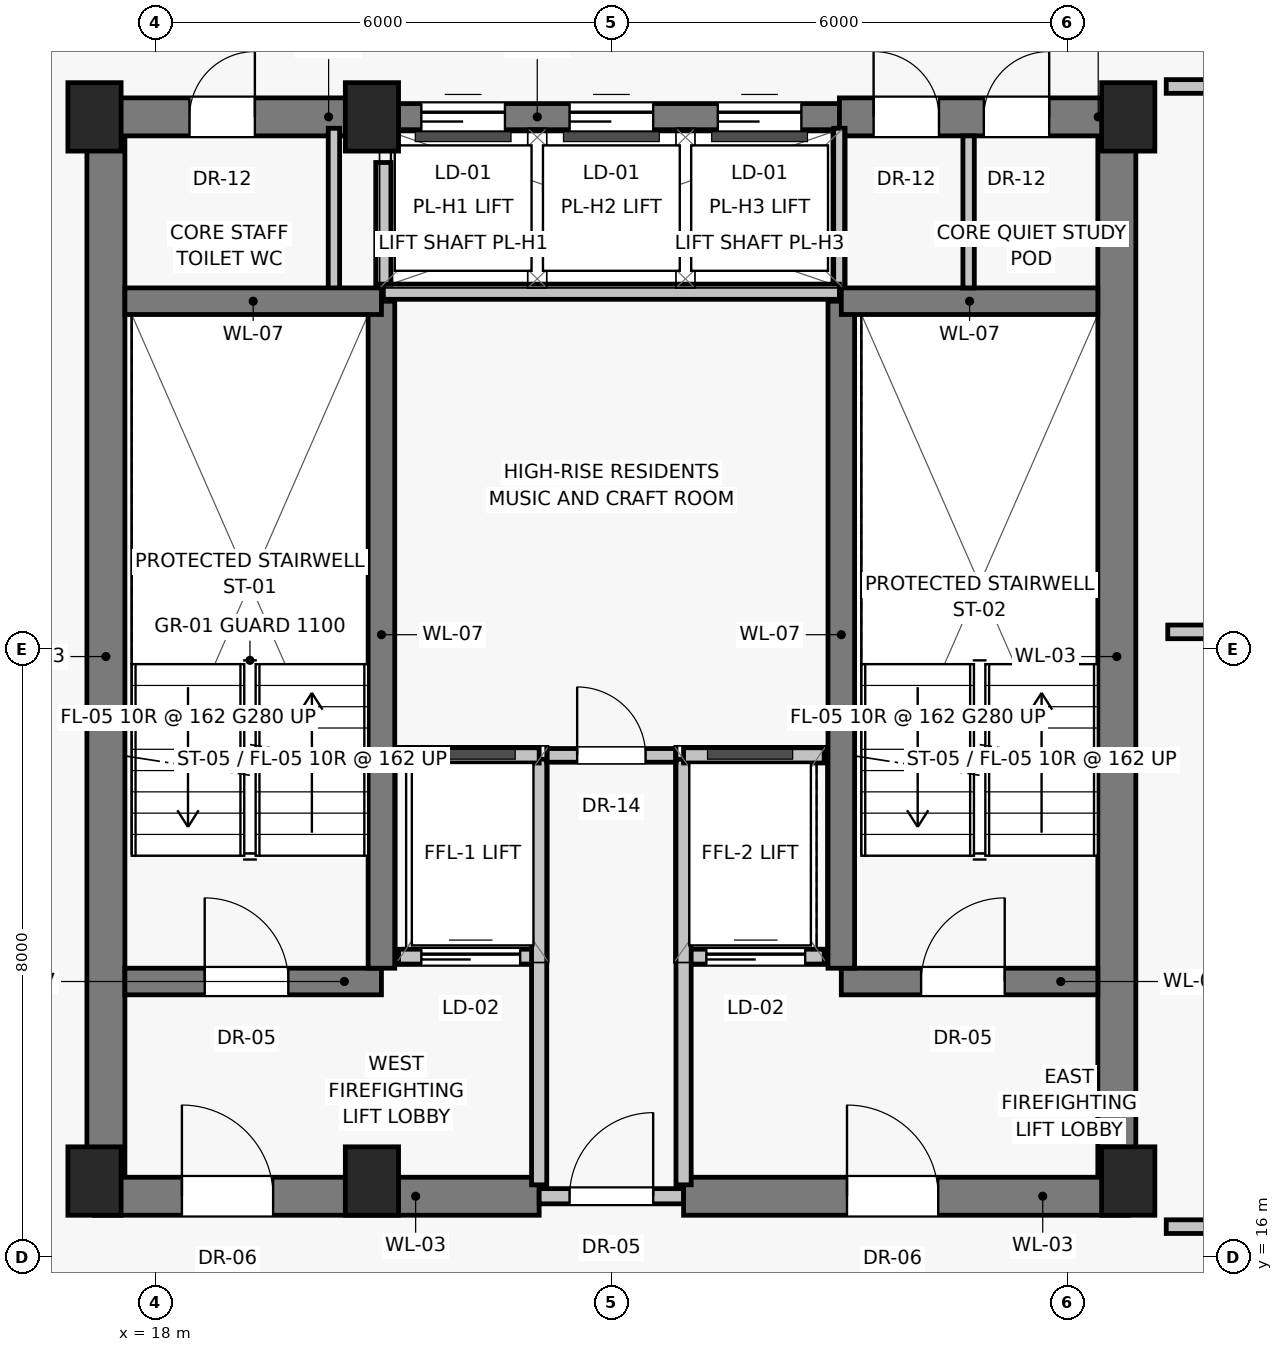
"""IFC4 building model, lengths in metres.
Left out: names, types, materials, properties, quantities, classifications, styles, units other than length and angle.
Written with IfcOpenShell. Run it as: python <this file> out.ifc"""

import sys

from ifc_helpers import new_model, si_unit, direction, frame, frame_2d, origin, origin_2d, place, context, subcontext, project, spatial, rectangle, extrude, source, transform, mapped, element, fill, save


model = new_model("IFC4")
c1 = context("Model", 3, precision=1e-05, world=origin(), true_north=direction((0.0, 1.0)))
c2 = subcontext(c1, "Body", "Model", "MODEL_VIEW")
j1 = project(units=[si_unit("LENGTHUNIT", "METRE"), si_unit("PLANEANGLEUNIT", "RADIAN")], contexts=[c1])
p1 = place(None, origin())
s1 = spatial("IfcSite", under=j1, at=p1, CompositionType="ELEMENT")
p2 = place(p1, origin())
s2 = spatial("IfcBuilding", under=s1, at=p2, CompositionType="ELEMENT")
p3 = place(p2, frame((0.0, 0.0, 208.1)))
s3 = spatial("IfcBuildingStorey", under=s2, at=p3, CompositionType="ELEMENT", Elevation=208.1)
for number, where, z_axis, x_axis in (
    (1, (17.2, 17.0, 0.0), (0.0, 0.0, 1.0), (1.0, 0.0, 0.0)),
    (2, (20.85, 17.0, 0.0), (0.0, 0.0, 1.0), (1.0, 0.0, 0.0)),
    (3, (30.8, 17.0, 0.0), (0.0, 0.0, 1.0), (1.0, 0.0, 0.0)),
    (4, (17.2, 31.0, 0.0), (0.0, 0.0, 1.0), (1.0, 0.0, 0.0)),
    (5, (20.85, 31.0, 0.0), (0.0, 0.0, 1.0), (1.0, 0.0, 0.0)),
    (6, (30.8, 31.0, 0.0), (0.0, 0.0, 1.0), (1.0, 0.0, 0.0)),
):
    element("IfcColumn", number, at=place(p3, frame(where, z_axis=z_axis, x_axis=x_axis)), inside=s3, PredefinedType="PILASTER", context=c2, shape_type="SweptSolid", body=[
        extrude(rectangle(XDim=0.7, YDim=0.9, at=origin_2d()), origin(), (0.0, 0.0, 1.0), 3.25),
    ])
for number, where, z_axis, x_axis in (
    (7, (17.35, 16.8, 0.0), (0.0, 0.0, 1.0), (0.0, 1.0, 0.0)),
    (8, (30.65, 16.8, 0.0), (0.0, 0.0, 1.0), (0.0, 1.0, 0.0)),
):
    element("IfcWall", number, at=place(p3, frame(where, z_axis=z_axis, x_axis=x_axis)), inside=s3, PredefinedType="SHEAR", context=c2, shape_type="SweptSolid", body=[
        extrude(rectangle(XDim=14.2, YDim=0.5, at=frame_2d((7.1, 0.0))), origin(), (0.0, 0.0, 1.0), 2.97),
    ])
p4 = place(p3, frame((17.2, 16.8, 0.0), z_axis=(0.0, 0.0, 1.0), x_axis=(1.0, 0.0, 0.0)))
e9 = element("IfcWall", 9, at=p4, inside=s3, PredefinedType="SHEAR", context=c2, shape_type="SweptSolid", body=[
    extrude(rectangle(XDim=5.85, YDim=0.5, at=frame_2d((2.925, 0.0))), origin(), (0.0, 0.0, 1.0), 2.97),
])
p5 = place(p4, frame((1.15, 0.0, 0.0)))
e10 = element("IfcOpeningElement", 10, at=p5, cuts=e9, PredefinedType="OPENING", context=c2, shape_type="SweptSolid", body=[
    extrude(rectangle(XDim=1.2, YDim=2.03, at=frame_2d((0.6, 1.015))), frame((0.0, 0.26, 0.0), z_axis=(0.0, -1.0, 0.0), x_axis=(1.0, 0.0, 0.0)), (0.0, 0.0, 1.0), 0.52),
])
p6 = place(p3, frame((23.05, 16.8, 0.0), z_axis=(0.0, 0.0, 1.0), x_axis=(1.0, 0.0, 0.0)))
e11 = element("IfcWall", 11, at=p6, inside=s3, PredefinedType="SOLIDWALL", context=c2, shape_type="SweptSolid", body=[
    extrude(rectangle(XDim=1.9, YDim=0.2, at=frame_2d((0.95, 0.0))), origin(), (0.0, 0.0, 1.0), 2.12),
])
p7 = place(p6, frame((0.4, 0.0, 0.0)))
e12 = element("IfcOpeningElement", 12, at=p7, cuts=e11, PredefinedType="OPENING", context=c2, shape_type="SweptSolid", body=[
    extrude(rectangle(XDim=1.1, YDim=2.03, at=frame_2d((0.55, 1.015))), frame((0.0, 0.11, 0.0), z_axis=(0.0, -1.0, 0.0), x_axis=(1.0, 0.0, 0.0)), (0.0, 0.0, 1.0), 0.22),
])
p8 = place(p3, frame((24.95, 16.8, 0.0), z_axis=(0.0, 0.0, 1.0), x_axis=(1.0, 0.0, 0.0)))
e13 = element("IfcWall", 13, at=p8, inside=s3, PredefinedType="SHEAR", context=c2, shape_type="SweptSolid", body=[
    extrude(rectangle(XDim=5.85, YDim=0.5, at=frame_2d((2.925, 0.0))), origin(), (0.0, 0.0, 1.0), 2.97),
])
p9 = place(p8, frame((2.15, 0.0, 0.0)))
e14 = element("IfcOpeningElement", 14, at=p9, cuts=e13, PredefinedType="OPENING", context=c2, shape_type="SweptSolid", body=[
    extrude(rectangle(XDim=1.2, YDim=2.03, at=frame_2d((0.6, 1.015))), frame((0.0, 0.26, 0.0), z_axis=(0.0, -1.0, 0.0), x_axis=(1.0, 0.0, 0.0)), (0.0, 0.0, 1.0), 0.52),
])
p10 = place(p3, frame((17.2, 31.0, 0.0), z_axis=(0.0, 0.0, 1.0), x_axis=(1.0, 0.0, 0.0)))
e15 = element("IfcWall", 15, at=p10, inside=s3, PredefinedType="SHEAR", context=c2, shape_type="SweptSolid", body=[
    extrude(rectangle(XDim=3.8, YDim=0.5, at=frame_2d((1.9, 0.0))), origin(), (0.0, 0.0, 1.0), 2.97),
])
p11 = place(p10, frame((1.25, 0.0, 0.0)))
e16 = element("IfcOpeningElement", 16, at=p11, cuts=e15, PredefinedType="OPENING", context=c2, shape_type="SweptSolid", body=[
    extrude(rectangle(XDim=0.86, YDim=2.01, at=frame_2d((0.43, 1.005))), frame((0.0, 0.26, 0.0), z_axis=(0.0, -1.0, 0.0), x_axis=(1.0, 0.0, 0.0)), (0.0, 0.0, 1.0), 0.52),
])
p12 = place(p3, frame((21.0, 31.0, 0.0), z_axis=(0.0, 0.0, 1.0), x_axis=(1.0, 0.0, 0.0)))
e17 = element("IfcWall", 17, at=p12, inside=s3, PredefinedType="SHEAR", context=c2, shape_type="SweptSolid", body=[
    extrude(rectangle(XDim=6.0, YDim=0.35, at=frame_2d((3.0, 0.0))), origin(), (0.0, 0.0, 1.0), 2.97),
])
p13 = place(p12, frame((0.5, 0.0, 0.0)))
e18 = element("IfcOpeningElement", 18, at=p13, cuts=e17, PredefinedType="OPENING", context=c2, shape_type="SweptSolid", body=[
    extrude(rectangle(XDim=1.1, YDim=2.08, at=frame_2d((0.55, 1.04))), frame((0.0, 0.185, 0.0), z_axis=(0.0, -1.0, 0.0), x_axis=(1.0, 0.0, 0.0)), (0.0, 0.0, 1.0), 0.37),
])
p14 = place(p12, frame((2.45, 0.0, 0.0)))
e19 = element("IfcOpeningElement", 19, at=p14, cuts=e17, PredefinedType="OPENING", context=c2, shape_type="SweptSolid", body=[
    extrude(rectangle(XDim=1.1, YDim=2.08, at=frame_2d((0.55, 1.04))), frame((0.0, 0.185, 0.0), z_axis=(0.0, -1.0, 0.0), x_axis=(1.0, 0.0, 0.0)), (0.0, 0.0, 1.0), 0.37),
])
p15 = place(p12, frame((4.4, 0.0, 0.0)))
e20 = element("IfcOpeningElement", 20, at=p15, cuts=e17, PredefinedType="OPENING", context=c2, shape_type="SweptSolid", body=[
    extrude(rectangle(XDim=1.1, YDim=2.08, at=frame_2d((0.55, 1.04))), frame((0.0, 0.185, 0.0), z_axis=(0.0, -1.0, 0.0), x_axis=(1.0, 0.0, 0.0)), (0.0, 0.0, 1.0), 0.37),
])
p16 = place(p3, frame((27.0, 31.0, 0.0), z_axis=(0.0, 0.0, 1.0), x_axis=(1.0, 0.0, 0.0)))
e21 = element("IfcWall", 21, at=p16, inside=s3, PredefinedType="SHEAR", context=c2, shape_type="SweptSolid", body=[
    extrude(rectangle(XDim=3.8, YDim=0.5, at=frame_2d((1.9, 0.0))), origin(), (0.0, 0.0, 1.0), 2.97),
])
p17 = place(p16, frame((0.45, 0.0, 0.0)))
e22 = element("IfcOpeningElement", 22, at=p17, cuts=e21, PredefinedType="OPENING", context=c2, shape_type="SweptSolid", body=[
    extrude(rectangle(XDim=0.86, YDim=2.01, at=frame_2d((0.43, 1.005))), frame((0.0, 0.26, 0.0), z_axis=(0.0, -1.0, 0.0), x_axis=(1.0, 0.0, 0.0)), (0.0, 0.0, 1.0), 0.52),
])
p18 = place(p16, frame((1.9, 0.0, 0.0)))
e23 = element("IfcOpeningElement", 23, at=p18, cuts=e21, PredefinedType="OPENING", context=c2, shape_type="SweptSolid", body=[
    extrude(rectangle(XDim=0.86, YDim=2.01, at=frame_2d((0.43, 1.005))), frame((0.0, 0.26, 0.0), z_axis=(0.0, -1.0, 0.0), x_axis=(1.0, 0.0, 0.0)), (0.0, 0.0, 1.0), 0.52),
])
for number, where, z_axis, x_axis in (
    (24, (20.35, 28.65, 0.0), (0.0, 0.0, 1.0), (0.0, 1.0, 0.0)),
    (25, (27.0, 28.65, 0.0), (0.0, 0.0, 1.0), (0.0, 1.0, 0.0)),
):
    element("IfcWall", number, at=place(p3, frame(where, z_axis=z_axis, x_axis=x_axis)), inside=s3, PredefinedType="PARTITIONING", context=c2, shape_type="SweptSolid", body=[
        extrude(rectangle(XDim=2.2, YDim=0.15, at=frame_2d((1.1, 0.0))), origin(), (0.0, 0.0, 1.0), 2.97),
    ])
p19 = place(p3, frame((17.6, 19.625, 0.0), z_axis=(0.0, 0.0, 1.0), x_axis=(1.0, 0.0, 0.0)))
e26 = element("IfcWall", 26, at=p19, inside=s3, PredefinedType="SHEAR", context=c2, shape_type="SweptSolid", body=[
    extrude(rectangle(XDim=3.375, YDim=0.35, at=frame_2d((1.688, 0.0))), origin(), (0.0, 0.0, 1.0), 2.97),
])
p20 = place(p19, frame((1.05, 0.0, 0.0)))
e27 = element("IfcOpeningElement", 27, at=p20, cuts=e26, PredefinedType="OPENING", context=c2, shape_type="SweptSolid", body=[
    extrude(rectangle(XDim=1.1, YDim=2.03, at=frame_2d((0.55, 1.015))), frame((0.0, 0.185, 0.0), z_axis=(0.0, -1.0, 0.0), x_axis=(1.0, 0.0, 0.0)), (0.0, 0.0, 1.0), 0.37),
])
p21 = place(p3, frame((21.2, 19.95, 0.0), z_axis=(0.0, 0.0, 1.0), x_axis=(1.0, 0.0, 0.0)))
e28 = element("IfcWall", 28, at=p21, inside=s3, PredefinedType="SOLIDWALL", context=c2, shape_type="SweptSolid", body=[
    extrude(rectangle(XDim=1.85, YDim=0.2, at=frame_2d((0.925, 0.0))), origin(), (0.0, 0.0, 1.0), 2.97),
])
p22 = place(p21, frame((0.3, 0.0, 0.0)))
e29 = element("IfcOpeningElement", 29, at=p22, cuts=e28, PredefinedType="OPENING", context=c2, shape_type="SweptSolid", body=[
    extrude(rectangle(XDim=1.3, YDim=2.25, at=frame_2d((0.65, 1.125))), frame((0.0, 0.11, 0.0), z_axis=(0.0, -1.0, 0.0), x_axis=(1.0, 0.0, 0.0)), (0.0, 0.0, 1.0), 0.22),
])
p23 = place(p3, frame((24.95, 19.95, 0.0), z_axis=(0.0, 0.0, 1.0), x_axis=(1.0, 0.0, 0.0)))
e30 = element("IfcWall", 30, at=p23, inside=s3, PredefinedType="SOLIDWALL", context=c2, shape_type="SweptSolid", body=[
    extrude(rectangle(XDim=1.85, YDim=0.2, at=frame_2d((0.925, 0.0))), origin(), (0.0, 0.0, 1.0), 2.97),
])
p24 = place(p23, frame((0.3, 0.0, 0.0)))
e31 = element("IfcOpeningElement", 31, at=p24, cuts=e30, PredefinedType="OPENING", context=c2, shape_type="SweptSolid", body=[
    extrude(rectangle(XDim=1.3, YDim=2.25, at=frame_2d((0.65, 1.125))), frame((0.0, 0.11, 0.0), z_axis=(0.0, -1.0, 0.0), x_axis=(1.0, 0.0, 0.0)), (0.0, 0.0, 1.0), 0.22),
])
p25 = place(p3, frame((27.025, 19.625, 0.0), z_axis=(0.0, 0.0, 1.0), x_axis=(1.0, 0.0, 0.0)))
e32 = element("IfcWall", 32, at=p25, inside=s3, PredefinedType="SHEAR", context=c2, shape_type="SweptSolid", body=[
    extrude(rectangle(XDim=3.375, YDim=0.35, at=frame_2d((1.688, 0.0))), origin(), (0.0, 0.0, 1.0), 2.97),
])
p26 = place(p25, frame((1.05, 0.0, 0.0)))
e33 = element("IfcOpeningElement", 33, at=p26, cuts=e32, PredefinedType="OPENING", context=c2, shape_type="SweptSolid", body=[
    extrude(rectangle(XDim=1.1, YDim=2.03, at=frame_2d((0.55, 1.015))), frame((0.0, 0.185, 0.0), z_axis=(0.0, -1.0, 0.0), x_axis=(1.0, 0.0, 0.0)), (0.0, 0.0, 1.0), 0.37),
])
for number, where, z_axis, x_axis in (
    (34, (20.975, 19.8, 0.0), (0.0, 0.0, 1.0), (0.0, 1.0, 0.0)),
    (35, (27.025, 19.8, 0.0), (0.0, 0.0, 1.0), (0.0, 1.0, 0.0)),
):
    element("IfcWall", number, at=place(p3, frame(where, z_axis=z_axis, x_axis=x_axis)), inside=s3, PredefinedType="SHEAR", context=c2, shape_type="SweptSolid", body=[
        extrude(rectangle(XDim=8.775, YDim=0.35, at=frame_2d((4.387, 0.0))), origin(), (0.0, 0.0, 1.0), 2.97),
    ])
for number, where, z_axis, x_axis in (
    (36, (17.6, 28.575, 0.0), (0.0, 0.0, 1.0), (1.0, 0.0, 0.0)),
    (37, (27.025, 28.575, 0.0), (0.0, 0.0, 1.0), (1.0, 0.0, 0.0)),
):
    element("IfcWall", number, at=place(p3, frame(where, z_axis=z_axis, x_axis=x_axis)), inside=s3, PredefinedType="SHEAR", context=c2, shape_type="SweptSolid", body=[
        extrude(rectangle(XDim=3.375, YDim=0.35, at=frame_2d((1.688, 0.0))), origin(), (0.0, 0.0, 1.0), 2.97),
    ])
for number, where, z_axis, x_axis in (
    (38, (23.05, 16.95, 0.0), (0.0, 0.0, 1.0), (0.0, 1.0, 0.0)),
    (39, (24.95, 16.95, 0.0), (0.0, 0.0, 1.0), (0.0, 1.0, 0.0)),
):
    element("IfcWall", number, at=place(p3, frame(where, z_axis=z_axis, x_axis=x_axis)), inside=s3, PredefinedType="SOLIDWALL", context=c2, shape_type="SweptSolid", body=[
        extrude(rectangle(XDim=5.6, YDim=0.2, at=frame_2d((2.8, 0.0))), origin(), (0.0, 0.0, 1.0), 2.97),
    ])
for number, where, z_axis, x_axis in (
    (40, (21.2, 22.6, 0.0), (0.0, 0.0, 1.0), (1.0, 0.0, 0.0)),
    (41, (24.95, 22.6, 0.0), (0.0, 0.0, 1.0), (1.0, 0.0, 0.0)),
):
    element("IfcWall", number, at=place(p3, frame(where, z_axis=z_axis, x_axis=x_axis)), inside=s3, PredefinedType="SOLIDWALL", context=c2, shape_type="SweptSolid", body=[
        extrude(rectangle(XDim=1.85, YDim=0.2, at=frame_2d((0.925, 0.0))), origin(), (0.0, 0.0, 1.0), 2.97),
    ])
p27 = place(p3, frame((21.0, 28.7, 0.0), z_axis=(0.0, 0.0, 1.0), x_axis=(1.0, 0.0, 0.0)))
e42 = element("IfcWall", 42, at=p27, inside=s3, PredefinedType="SOLIDWALL", context=c2, shape_type="SweptSolid", body=[
    extrude(rectangle(XDim=6.0, YDim=0.2, at=frame_2d((3.0, 0.0))), origin(), (0.0, 0.0, 1.0), 2.97),
])
p28 = place(p3, frame((21.0, 28.8, 0.0), z_axis=(0.0, 0.0, 1.0), x_axis=(0.0, 1.0, 0.0)))
e43 = element("IfcWall", 43, at=p28, inside=s3, PredefinedType="SOLIDWALL", context=c2, shape_type="SweptSolid", body=[
    extrude(rectangle(XDim=1.6, YDim=0.2, at=frame_2d((0.8, 0.0))), origin(), (0.0, 0.0, 1.0), 2.97),
])
p29 = place(p3, frame((23.15, 22.6, 0.0), z_axis=(0.0, 0.0, 1.0), x_axis=(1.0, 0.0, 0.0)))
e44 = element("IfcWall", 44, at=p29, inside=s3, PredefinedType="PARTITIONING", context=c2, shape_type="SweptSolid", body=[
    extrude(rectangle(XDim=1.7, YDim=0.18, at=frame_2d((0.85, 0.0))), origin(), (0.0, 0.0, 1.0), 2.97),
])
p30 = place(p29, frame((0.4, 0.0, 0.0)))
e45 = element("IfcOpeningElement", 45, at=p30, cuts=e44, PredefinedType="OPENING", context=c2, shape_type="SweptSolid", body=[
    extrude(rectangle(XDim=0.9, YDim=2.01, at=frame_2d((0.45, 1.005))), frame((0.0, 0.1, 0.0), z_axis=(0.0, -1.0, 0.0), x_axis=(1.0, 0.0, 0.0)), (0.0, 0.0, 1.0), 0.2),
])
p31 = place(p3, frame((28.7, 28.75, 0.0), z_axis=(0.0, 0.0, 1.0), x_axis=(0.0, 1.0, 0.0)))
e46 = element("IfcWall", 46, at=p31, inside=s3, PredefinedType="PARTITIONING", context=c2, shape_type="SweptSolid", body=[
    extrude(rectangle(XDim=2.0, YDim=0.15, at=frame_2d((1.0, 0.0))), origin(), (0.0, 0.0, 1.0), 2.97),
])
p32 = place(p3, frame((31.32, 24.225, 0.0), z_axis=(0.0, 0.0, 1.0), x_axis=(1.0, 0.0, 0.0)))
e47 = element("IfcWall", 47, at=p32, inside=s3, PredefinedType="PARTITIONING", context=c2, shape_type="SweptSolid", body=[
    extrude(rectangle(XDim=10.423, YDim=0.18, at=frame_2d((5.212, 0.0))), origin(), (0.0, 0.0, 1.0), 2.97),
])
p33 = place(p3, frame((31.3, 16.4, 0.0), z_axis=(0.0, 0.0, 1.0), x_axis=(1.0, 0.0, 0.0)))
e48 = element("IfcWall", 48, at=p33, inside=s3, PredefinedType="PARTITIONING", context=c2, shape_type="SweptSolid", body=[
    extrude(rectangle(XDim=1.92, YDim=0.18, at=frame_2d((0.96, 0.0))), origin(), (0.0, 0.0, 1.0), 2.97),
])
p34 = place(p33, frame((0.72, 0.0, 0.0)))
e49 = element("IfcOpeningElement", 49, at=p34, cuts=e48, PredefinedType="OPENING", context=c2, shape_type="SweptSolid", body=[
    extrude(rectangle(XDim=1.0, YDim=2.01, at=frame_2d((0.5, 1.005))), frame((0.0, 0.1, 0.0), z_axis=(0.0, -1.0, 0.0), x_axis=(1.0, 0.0, 0.0)), (0.0, 0.0, 1.0), 0.2),
])
p35 = place(p3, frame((31.3, 31.4, 0.0), z_axis=(0.0, 0.0, 1.0), x_axis=(1.0, 0.0, 0.0)))
e50 = element("IfcWall", 50, at=p35, inside=s3, PredefinedType="PARTITIONING", context=c2, shape_type="SweptSolid", body=[
    extrude(rectangle(XDim=1.92, YDim=0.18, at=frame_2d((0.96, 0.0))), origin(), (0.0, 0.0, 1.0), 2.97),
])
p36 = place(p35, frame((0.72, 0.0, 0.0)))
e51 = element("IfcOpeningElement", 51, at=p36, cuts=e50, PredefinedType="OPENING", context=c2, shape_type="SweptSolid", body=[
    extrude(rectangle(XDim=1.0, YDim=2.01, at=frame_2d((0.5, 1.005))), frame((0.0, 0.1, 0.0), z_axis=(0.0, -1.0, 0.0), x_axis=(1.0, 0.0, 0.0)), (0.0, 0.0, 1.0), 0.2),
])
m1 = source(origin(), c2, "Body", "SweptSolid", [
    extrude(rectangle(XDim=1.2, YDim=2.03, at=frame_2d((0.6, 1.015))), frame((0.0, 0.025, 0.0), z_axis=(0.0, -1.0, 0.0), x_axis=(1.0, 0.0, 0.0)), (0.0, 0.0, 1.0), 0.05),
])
p37 = place(p5, origin())
e52 = element("IfcDoor", 52, at=p37, inside=s3, OperationType="SINGLE_SWING_LEFT", PredefinedType="DOOR", context=c2, shape_type="MappedRepresentation", body=[
    mapped(m1, transform((0.0, 0.0, 0.0), scale=1.0)),
])
fill(e10, e52)
m2 = source(origin(), c2, "Body", "SweptSolid", [
    extrude(rectangle(XDim=1.1, YDim=2.03, at=frame_2d((0.55, 1.015))), frame((0.0, 0.025, 0.0), z_axis=(0.0, -1.0, 0.0), x_axis=(1.0, 0.0, 0.0)), (0.0, 0.0, 1.0), 0.05),
])
p38 = place(p7, origin())
e53 = element("IfcDoor", 53, at=p38, inside=s3, OperationType="SINGLE_SWING_RIGHT", PredefinedType="DOOR", context=c2, shape_type="MappedRepresentation", body=[
    mapped(m2, transform((0.0, 0.0, 0.0), scale=1.0)),
])
fill(e12, e53)
p39 = place(p9, origin())
e54 = element("IfcDoor", 54, at=p39, inside=s3, OperationType="SINGLE_SWING_LEFT", PredefinedType="DOOR", context=c2, shape_type="MappedRepresentation", body=[
    mapped(m1, transform((0.0, 0.0, 0.0), scale=1.0)),
])
fill(e14, e54)
m3 = source(origin(), c2, "Body", "SweptSolid", [
    extrude(rectangle(XDim=0.86, YDim=2.01, at=frame_2d((0.43, 1.005))), frame((0.0, 0.025, 0.0), z_axis=(0.0, -1.0, 0.0), x_axis=(1.0, 0.0, 0.0)), (0.0, 0.0, 1.0), 0.05),
])
p40 = place(p11, origin())
e55 = element("IfcDoor", 55, at=p40, inside=s3, OperationType="SINGLE_SWING_RIGHT", PredefinedType="DOOR", context=c2, shape_type="MappedRepresentation", body=[
    mapped(m3, transform((0.0, 0.0, 0.0), scale=1.0)),
])
fill(e16, e55)
m4 = source(origin(), c2, "Body", "SweptSolid", [
    extrude(rectangle(XDim=1.1, YDim=2.08, at=frame_2d((0.55, 1.04))), frame((0.0, 0.025, 0.0), z_axis=(0.0, -1.0, 0.0), x_axis=(1.0, 0.0, 0.0)), (0.0, 0.0, 1.0), 0.05),
])
p41 = place(p13, origin())
e56 = element("IfcDoor", 56, at=p41, inside=s3, OperationType="SLIDING_TO_LEFT", PredefinedType="DOOR", context=c2, shape_type="MappedRepresentation", body=[
    mapped(m4, transform((0.0, 0.0, 0.0), scale=1.0)),
])
fill(e18, e56)
p42 = place(p14, origin())
e57 = element("IfcDoor", 57, at=p42, inside=s3, OperationType="SLIDING_TO_LEFT", PredefinedType="DOOR", context=c2, shape_type="MappedRepresentation", body=[
    mapped(m4, transform((0.0, 0.0, 0.0), scale=1.0)),
])
fill(e19, e57)
p43 = place(p15, origin())
e58 = element("IfcDoor", 58, at=p43, inside=s3, OperationType="SLIDING_TO_LEFT", PredefinedType="DOOR", context=c2, shape_type="MappedRepresentation", body=[
    mapped(m4, transform((0.0, 0.0, 0.0), scale=1.0)),
])
fill(e20, e58)
p44 = place(p17, origin())
e59 = element("IfcDoor", 59, at=p44, inside=s3, OperationType="SINGLE_SWING_LEFT", PredefinedType="DOOR", context=c2, shape_type="MappedRepresentation", body=[
    mapped(m3, transform((0.0, 0.0, 0.0), scale=1.0)),
])
fill(e22, e59)
p45 = place(p18, origin())
e60 = element("IfcDoor", 60, at=p45, inside=s3, OperationType="SINGLE_SWING_RIGHT", PredefinedType="DOOR", context=c2, shape_type="MappedRepresentation", body=[
    mapped(m3, transform((0.0, 0.0, 0.0), scale=1.0)),
])
fill(e23, e60)
p46 = place(p20, origin())
e61 = element("IfcDoor", 61, at=p46, inside=s3, OperationType="SINGLE_SWING_LEFT", PredefinedType="DOOR", context=c2, shape_type="MappedRepresentation", body=[
    mapped(m2, transform((0.0, 0.0, 0.0), scale=1.0)),
])
fill(e27, e61)
m5 = source(origin(), c2, "Body", "SweptSolid", [
    extrude(rectangle(XDim=1.3, YDim=2.25, at=frame_2d((0.65, 1.125))), frame((0.0, 0.025, 0.0), z_axis=(0.0, -1.0, 0.0), x_axis=(1.0, 0.0, 0.0)), (0.0, 0.0, 1.0), 0.05),
])
p47 = place(p22, origin())
e62 = element("IfcDoor", 62, at=p47, inside=s3, OperationType="SLIDING_TO_LEFT", PredefinedType="DOOR", context=c2, shape_type="MappedRepresentation", body=[
    mapped(m5, transform((0.0, 0.0, 0.0), scale=1.0)),
])
fill(e29, e62)
p48 = place(p24, origin())
e63 = element("IfcDoor", 63, at=p48, inside=s3, OperationType="SLIDING_TO_LEFT", PredefinedType="DOOR", context=c2, shape_type="MappedRepresentation", body=[
    mapped(m5, transform((0.0, 0.0, 0.0), scale=1.0)),
])
fill(e31, e63)
p49 = place(p26, origin())
e64 = element("IfcDoor", 64, at=p49, inside=s3, OperationType="SINGLE_SWING_RIGHT", PredefinedType="DOOR", context=c2, shape_type="MappedRepresentation", body=[
    mapped(m2, transform((0.0, 0.0, 0.0), scale=1.0)),
])
fill(e33, e64)
m6 = source(origin(), c2, "Body", "SweptSolid", [
    extrude(rectangle(XDim=0.9, YDim=2.01, at=frame_2d((0.45, 1.005))), frame((0.0, 0.025, 0.0), z_axis=(0.0, -1.0, 0.0), x_axis=(1.0, 0.0, 0.0)), (0.0, 0.0, 1.0), 0.05),
])
p50 = place(p30, origin())
e65 = element("IfcDoor", 65, at=p50, inside=s3, OperationType="SINGLE_SWING_LEFT", PredefinedType="DOOR", context=c2, shape_type="MappedRepresentation", body=[
    mapped(m6, transform((0.0, 0.0, 0.0), scale=1.0)),
])
fill(e45, e65)
save(model, sys.argv[1])
